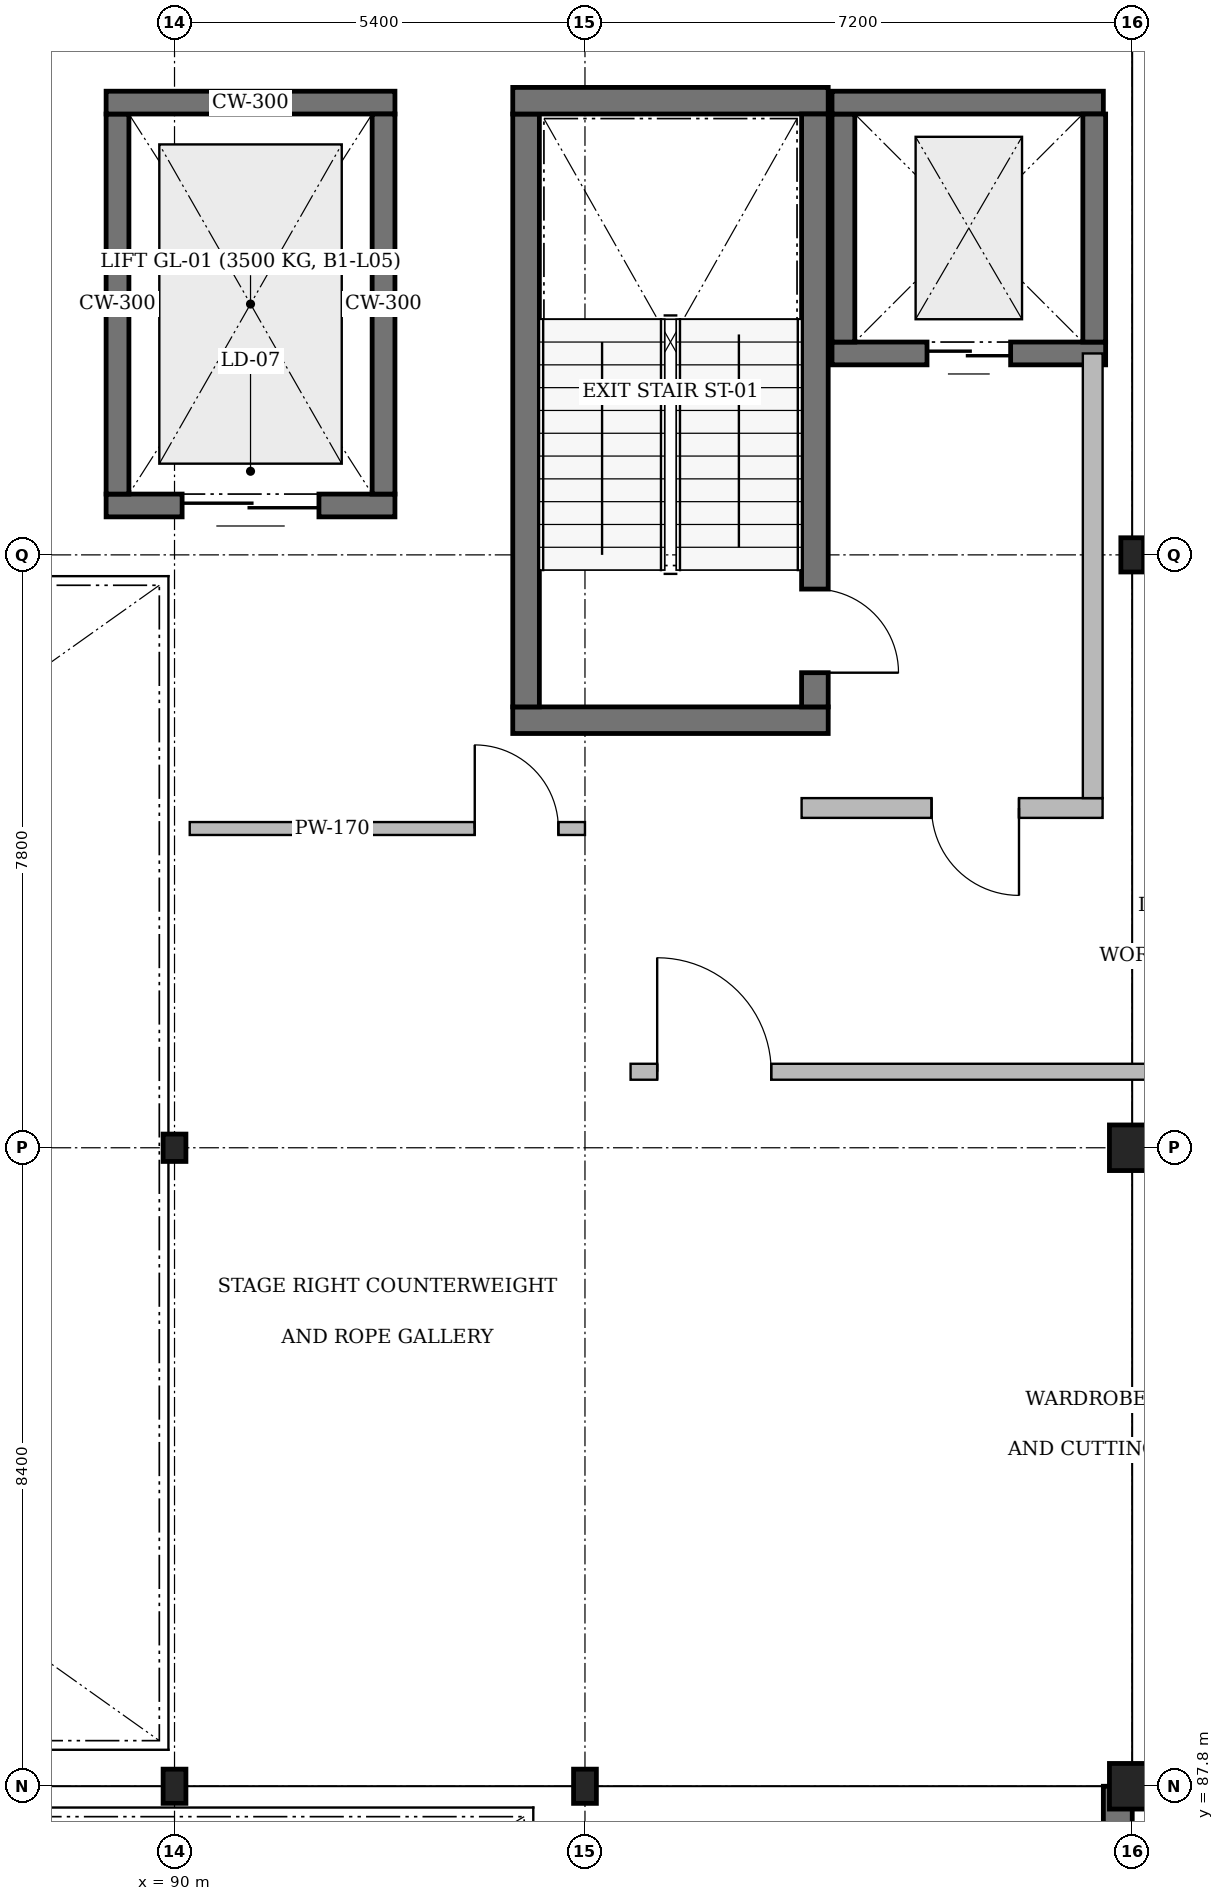
"""IFC4 building model, lengths in metres.
Left out: names, types, materials, properties, quantities, classifications, styles, units other than length and angle.
Written with IfcOpenShell. Run it as: python <this file> out.ifc"""

import sys

from ifc_helpers import new_model, si_unit, direction, frame, frame_2d, origin, origin_2d, place, context, subcontext, project, spatial, rectangle, i_section, extrude, element, fill, save


model = new_model("IFC4")
c1 = context("Model", 3, precision=1e-05, world=origin(), true_north=direction((0.0, 1.0)))
c2 = subcontext(c1, "Body", "Model", "MODEL_VIEW")
j1 = project(units=[si_unit("LENGTHUNIT", "METRE"), si_unit("PLANEANGLEUNIT", "RADIAN")], contexts=[c1])
p1 = place(None, origin())
s1 = spatial("IfcSite", under=j1, at=p1, CompositionType="ELEMENT")
p2 = place(p1, origin())
s2 = spatial("IfcBuilding", under=s1, at=p2, CompositionType="ELEMENT")
p3 = place(p2, frame((0.0, 0.0, 9.0)))
s3 = spatial("IfcBuildingStorey", under=s2, at=p3, CompositionType="ELEMENT", Elevation=9.0)
p4 = place(p3, frame((90.0, 87.8, 0.0), z_axis=(0.0, 0.0, 1.0), x_axis=(1.0, 0.0, 0.0)))
e1 = element("IfcColumn", 1, at=p4, inside=s3, PredefinedType="COLUMN", context=c2, shape_type="SweptSolid", body=[
    extrude(i_section(OverallWidth=0.3, OverallDepth=0.45, WebThickness=0.014, FlangeThickness=0.026, FilletRadius=0.027, at=origin_2d()), origin(), (0.0, 0.0, 1.0), 4.2),
])
p5 = place(p3, frame((90.0, 96.2, 0.0), z_axis=(0.0, 0.0, 1.0), x_axis=(1.0, 0.0, 0.0)))
e2 = element("IfcColumn", 2, at=p5, inside=s3, PredefinedType="COLUMN", context=c2, shape_type="SweptSolid", body=[
    extrude(i_section(OverallWidth=0.3, OverallDepth=0.36, WebThickness=0.012, FlangeThickness=0.022, FilletRadius=0.027, at=origin_2d()), origin(), (0.0, 0.0, 1.0), 4.2),
])
p6 = place(p3, frame((95.4, 87.8, 0.0), z_axis=(0.0, 0.0, 1.0), x_axis=(1.0, 0.0, 0.0)))
e3 = element("IfcColumn", 3, at=p6, inside=s3, PredefinedType="COLUMN", context=c2, shape_type="SweptSolid", body=[
    extrude(i_section(OverallWidth=0.3, OverallDepth=0.45, WebThickness=0.014, FlangeThickness=0.026, FilletRadius=0.027, at=origin_2d()), origin(), (0.0, 0.0, 1.0), 4.2),
])
for number, where, z_axis, x_axis in (
    (4, (102.6, 87.8, 0.0), (0.0, 0.0, 1.0), (1.0, 0.0, 0.0)),
    (5, (102.6, 96.2, 0.0), (0.0, 0.0, 1.0), (1.0, 0.0, 0.0)),
):
    element("IfcColumn", number, at=place(p3, frame(where, z_axis=z_axis, x_axis=x_axis)), inside=s3, PredefinedType="COLUMN", context=c2, shape_type="SweptSolid", body=[
        extrude(rectangle(XDim=0.6, YDim=0.6, at=origin_2d()), origin(), (0.0, 0.0, 1.0), 4.2),
    ])
p7 = place(p3, frame((102.6, 104.0, 0.0), z_axis=(0.0, 0.0, 1.0), x_axis=(1.0, 0.0, 0.0)))
e6 = element("IfcColumn", 6, at=p7, inside=s3, PredefinedType="COLUMN", context=c2, shape_type="SweptSolid", body=[
    extrude(i_section(OverallWidth=0.3, OverallDepth=0.45, WebThickness=0.014, FlangeThickness=0.026, FilletRadius=0.027, at=origin_2d()), origin(), (0.0, 0.0, 1.0), 4.2),
])
p8 = place(p3, frame((98.6, 101.825, 0.0), z_axis=(0.0, 0.0, 1.0), x_axis=(-1.0, 0.0, 0.0)))
e7 = element("IfcWall", 7, at=p8, inside=s3, PredefinedType="SOLIDWALL", context=c2, shape_type="SweptSolid", body=[
    extrude(rectangle(XDim=4.15, YDim=0.35, at=frame_2d((2.075, 0.0))), origin(), (0.0, 0.0, 1.0), 4.2),
])
p9 = place(p3, frame((94.625, 102.0, 0.0), z_axis=(0.0, 0.0, 1.0), x_axis=(0.0, 1.0, 0.0)))
e8 = element("IfcWall", 8, at=p9, inside=s3, PredefinedType="SOLIDWALL", context=c2, shape_type="SweptSolid", body=[
    extrude(rectangle(XDim=7.8, YDim=0.35, at=frame_2d((3.9, 0.0))), origin(), (0.0, 0.0, 1.0), 4.2),
])
p10 = place(p3, frame((94.45, 109.975, 0.0), z_axis=(0.0, 0.0, 1.0), x_axis=(1.0, 0.0, 0.0)))
e9 = element("IfcWall", 9, at=p10, inside=s3, PredefinedType="SOLIDWALL", context=c2, shape_type="SweptSolid", body=[
    extrude(rectangle(XDim=4.15, YDim=0.35, at=frame_2d((2.075, 0.0))), origin(), (0.0, 0.0, 1.0), 4.2),
])
p11 = place(p3, frame((98.425, 109.8, 0.0), z_axis=(0.0, 0.0, 1.0), x_axis=(0.0, -1.0, 0.0)))
e10 = element("IfcWall", 10, at=p11, inside=s3, PredefinedType="SOLIDWALL", context=c2, shape_type="SweptSolid", body=[
    extrude(rectangle(XDim=7.8, YDim=0.35, at=frame_2d((3.9, 0.0))), origin(), (0.0, 0.0, 1.0), 4.2),
])
p12 = place(p11, frame((6.25, 0.0, 0.0)))
e11 = element("IfcOpeningElement", 11, at=p12, cuts=e10, PredefinedType="OPENING", context=c2, shape_type="SweptSolid", body=[
    extrude(rectangle(XDim=1.1, YDim=2.15, at=frame_2d((0.55, 1.075))), frame((0.0, 0.195, 0.0), z_axis=(0.0, -1.0, 0.0), x_axis=(1.0, 0.0, 0.0)), (0.0, 0.0, 1.0), 0.39),
])
p13 = place(p3, frame((102.25, 106.65, 0.0), z_axis=(0.0, 0.0, 1.0), x_axis=(-1.0, 0.0, 0.0)))
e12 = element("IfcWall", 12, at=p13, inside=s3, PredefinedType="SOLIDWALL", context=c2, shape_type="SweptSolid", body=[
    extrude(rectangle(XDim=3.6, YDim=0.3, at=frame_2d((1.8, 0.0))), origin(), (0.0, 0.0, 1.0), 4.2),
])
p14 = place(p13, frame((1.25, 0.0, 0.0)))
e13 = element("IfcOpeningElement", 13, at=p14, cuts=e12, PredefinedType="OPENING", context=c2, shape_type="SweptSolid", body=[
    extrude(rectangle(XDim=1.1, YDim=2.1, at=frame_2d((0.55, 1.05))), frame((0.0, 0.17, 0.0), z_axis=(0.0, -1.0, 0.0), x_axis=(1.0, 0.0, 0.0)), (0.0, 0.0, 1.0), 0.34),
])
p15 = place(p3, frame((98.8, 106.8, 0.0), z_axis=(0.0, 0.0, 1.0), x_axis=(0.0, 1.0, 0.0)))
e14 = element("IfcWall", 14, at=p15, inside=s3, PredefinedType="SOLIDWALL", context=c2, shape_type="SweptSolid", body=[
    extrude(rectangle(XDim=3.0, YDim=0.3, at=frame_2d((1.5, 0.0))), origin(), (0.0, 0.0, 1.0), 4.2),
])
p16 = place(p3, frame((98.65, 109.95, 0.0), z_axis=(0.0, 0.0, 1.0), x_axis=(1.0, 0.0, 0.0)))
e15 = element("IfcWall", 15, at=p16, inside=s3, PredefinedType="SOLIDWALL", context=c2, shape_type="SweptSolid", body=[
    extrude(rectangle(XDim=3.57, YDim=0.3, at=frame_2d((1.785, 0.0))), origin(), (0.0, 0.0, 1.0), 4.2),
])
p17 = place(p3, frame((102.1, 109.8, 0.0), z_axis=(0.0, 0.0, 1.0), x_axis=(0.0, -1.0, 0.0)))
e16 = element("IfcWall", 16, at=p17, inside=s3, PredefinedType="SOLIDWALL", context=c2, shape_type="SweptSolid", body=[
    extrude(rectangle(XDim=3.0, YDim=0.3, at=frame_2d((1.5, 0.0))), origin(), (0.0, 0.0, 1.0), 4.2),
])
p18 = place(p3, frame((102.21, 100.67, 0.0), z_axis=(0.0, 0.0, 1.0), x_axis=(-1.0, 0.0, 0.0)))
e17 = element("IfcWall", 17, at=p18, inside=s3, PredefinedType="SOLIDWALL", context=c2, shape_type="SweptSolid", body=[
    extrude(rectangle(XDim=3.96, YDim=0.26, at=frame_2d((1.98, 0.0))), origin(), (0.0, 0.0, 1.0), 3.95),
])
p19 = place(p18, frame((1.1, 0.0, 0.0)))
e18 = element("IfcOpeningElement", 18, at=p19, cuts=e17, PredefinedType="OPENING", context=c2, shape_type="SweptSolid", body=[
    extrude(rectangle(XDim=1.15, YDim=2.2, at=frame_2d((0.575, 1.1))), frame((0.0, 0.15, 0.0), z_axis=(0.0, -1.0, 0.0), x_axis=(1.0, 0.0, 0.0)), (0.0, 0.0, 1.0), 0.3),
])
p20 = place(p3, frame((102.08, 106.65, 0.0), z_axis=(0.0, 0.0, 1.0), x_axis=(0.0, -1.0, 0.0)))
e19 = element("IfcWall", 19, at=p20, inside=s3, PredefinedType="SOLIDWALL", context=c2, shape_type="SweptSolid", body=[
    extrude(rectangle(XDim=5.85, YDim=0.26, at=frame_2d((2.925, 0.0))), origin(), (0.0, 0.0, 1.0), 3.95),
])
p21 = place(p3, frame((92.9, 104.65, 0.0), z_axis=(0.0, 0.0, 1.0), x_axis=(-1.0, 0.0, 0.0)))
e20 = element("IfcWall", 20, at=p21, inside=s3, PredefinedType="SOLIDWALL", context=c2, shape_type="SweptSolid", body=[
    extrude(rectangle(XDim=3.8, YDim=0.3, at=frame_2d((1.9, 0.0))), origin(), (0.0, 0.0, 1.0), 4.2),
])
p22 = place(p21, frame((1.0, 0.0, 0.0)))
e21 = element("IfcOpeningElement", 21, at=p22, cuts=e20, PredefinedType="OPENING", context=c2, shape_type="SweptSolid", body=[
    extrude(rectangle(XDim=1.8, YDim=2.4, at=frame_2d((0.9, 1.2))), frame((0.0, 0.17, 0.0), z_axis=(0.0, -1.0, 0.0), x_axis=(1.0, 0.0, 0.0)), (0.0, 0.0, 1.0), 0.34),
])
p23 = place(p3, frame((89.25, 104.8, 0.0), z_axis=(0.0, 0.0, 1.0), x_axis=(0.0, 1.0, 0.0)))
e22 = element("IfcWall", 22, at=p23, inside=s3, PredefinedType="SOLIDWALL", context=c2, shape_type="SweptSolid", body=[
    extrude(rectangle(XDim=5.0, YDim=0.3, at=frame_2d((2.5, 0.0))), origin(), (0.0, 0.0, 1.0), 4.2),
])
p24 = place(p3, frame((89.1, 109.95, 0.0), z_axis=(0.0, 0.0, 1.0), x_axis=(1.0, 0.0, 0.0)))
e23 = element("IfcWall", 23, at=p24, inside=s3, PredefinedType="SOLIDWALL", context=c2, shape_type="SweptSolid", body=[
    extrude(rectangle(XDim=3.8, YDim=0.3, at=frame_2d((1.9, 0.0))), origin(), (0.0, 0.0, 1.0), 4.2),
])
p25 = place(p3, frame((92.75, 109.8, 0.0), z_axis=(0.0, 0.0, 1.0), x_axis=(0.0, -1.0, 0.0)))
e24 = element("IfcWall", 24, at=p25, inside=s3, PredefinedType="SOLIDWALL", context=c2, shape_type="SweptSolid", body=[
    extrude(rectangle(XDim=5.0, YDim=0.3, at=frame_2d((2.5, 0.0))), origin(), (0.0, 0.0, 1.0), 4.2),
])
p26 = place(p3, frame((102.41, 87.8, 0.0), z_axis=(0.0, 0.0, 1.0), x_axis=(0.0, -1.0, 0.0)))
e25 = element("IfcWall", 25, at=p26, inside=s3, PredefinedType="SOLIDWALL", context=c2, shape_type="SweptSolid", body=[
    extrude(rectangle(XDim=36.0, YDim=0.38, at=frame_2d((18.0, 0.0))), origin(), (0.0, 0.0, 1.0), 3.96),
])
p27 = place(p26, frame((3.09, 0.0, 0.95)))
e26 = element("IfcOpeningElement", 26, at=p27, cuts=e25, PredefinedType="OPENING", context=c2, shape_type="SweptSolid", body=[
    extrude(rectangle(XDim=1.02, YDim=1.8, at=frame_2d((0.51, 0.9))), frame((0.0, 0.21, 0.0), z_axis=(0.0, -1.0, 0.0), x_axis=(1.0, 0.0, 0.0)), (0.0, 0.0, 1.0), 0.42),
])
p28 = place(p26, frame((10.11, 0.0, 0.95)))
e27 = element("IfcOpeningElement", 27, at=p28, cuts=e25, PredefinedType="OPENING", context=c2, shape_type="SweptSolid", body=[
    extrude(rectangle(XDim=1.38, YDim=1.95, at=frame_2d((0.69, 0.975))), frame((0.0, 0.21, 0.0), z_axis=(0.0, -1.0, 0.0), x_axis=(1.0, 0.0, 0.0)), (0.0, 0.0, 1.0), 0.42),
])
p29 = place(p26, frame((17.375, 0.0, 0.95)))
e28 = element("IfcOpeningElement", 28, at=p29, cuts=e25, PredefinedType="OPENING", context=c2, shape_type="SweptSolid", body=[
    extrude(rectangle(XDim=1.25, YDim=1.9, at=frame_2d((0.625, 0.95))), frame((0.0, 0.21, 0.0), z_axis=(0.0, -1.0, 0.0), x_axis=(1.0, 0.0, 0.0)), (0.0, 0.0, 1.0), 0.42),
])
p30 = place(p26, frame((24.63, 0.0, 0.95)))
e29 = element("IfcOpeningElement", 29, at=p30, cuts=e25, PredefinedType="OPENING", context=c2, shape_type="SweptSolid", body=[
    extrude(rectangle(XDim=1.14, YDim=1.85, at=frame_2d((0.57, 0.925))), frame((0.0, 0.21, 0.0), z_axis=(0.0, -1.0, 0.0), x_axis=(1.0, 0.0, 0.0)), (0.0, 0.0, 1.0), 0.42),
])
p31 = place(p26, frame((31.525, 0.0, 0.95)))
e30 = element("IfcOpeningElement", 30, at=p31, cuts=e25, PredefinedType="OPENING", context=c2, shape_type="SweptSolid", body=[
    extrude(rectangle(XDim=1.75, YDim=1.65, at=frame_2d((0.875, 0.825))), frame((0.0, 0.21, 0.0), z_axis=(0.0, -1.0, 0.0), x_axis=(1.0, 0.0, 0.0)), (0.0, 0.0, 1.0), 0.42),
])
p32 = place(p3, frame((96.0, 97.2, 0.0), z_axis=(0.0, 0.0, 1.0), x_axis=(1.0, 0.0, 0.0)))
e31 = element("IfcWall", 31, at=p32, inside=s3, PredefinedType="PARTITIONING", context=c2, shape_type="SweptSolid", body=[
    extrude(rectangle(XDim=13.6, YDim=0.21, at=frame_2d((6.8, 0.0))), origin(), (0.0, 0.0, 1.0), 3.95),
])
p33 = place(p32, frame((0.35, 0.0, 0.0)))
e32 = element("IfcOpeningElement", 32, at=p33, cuts=e31, PredefinedType="OPENING", context=c2, shape_type="SweptSolid", body=[
    extrude(rectangle(XDim=1.5, YDim=2.25, at=frame_2d((0.75, 1.125))), frame((0.0, 0.125, 0.0), z_axis=(0.0, -1.0, 0.0), x_axis=(1.0, 0.0, 0.0)), (0.0, 0.0, 1.0), 0.25),
])
p34 = place(p3, frame((90.2, 100.4, 0.0), z_axis=(0.0, 0.0, 1.0), x_axis=(1.0, 0.0, 0.0)))
e33 = element("IfcWall", 33, at=p34, inside=s3, PredefinedType="PARTITIONING", context=c2, shape_type="SweptSolid", body=[
    extrude(rectangle(XDim=5.2, YDim=0.17, at=frame_2d((2.6, 0.0))), origin(), (0.0, 0.0, 1.0), 3.95),
])
p35 = place(p34, frame((3.75, 0.0, 0.0)))
e34 = element("IfcOpeningElement", 34, at=p35, cuts=e33, PredefinedType="OPENING", context=c2, shape_type="SweptSolid", body=[
    extrude(rectangle(XDim=1.1, YDim=2.1, at=frame_2d((0.55, 1.05))), frame((0.0, 0.105, 0.0), z_axis=(0.0, -1.0, 0.0), x_axis=(1.0, 0.0, 0.0)), (0.0, 0.0, 1.0), 0.21),
])
p36 = place(p12, origin())
e35 = element("IfcDoor", 35, at=p36, inside=s3, OperationType="SINGLE_SWING_RIGHT", PredefinedType="DOOR", context=c2, shape_type="SweptSolid", body=[
    extrude(rectangle(XDim=1.1, YDim=2.15, at=frame_2d((0.55, 1.075))), frame((0.0, 0.025, 0.0), z_axis=(0.0, -1.0, 0.0), x_axis=(1.0, 0.0, 0.0)), (0.0, 0.0, 1.0), 0.05),
])
fill(e11, e35)
p37 = place(p14, origin())
e36 = element("IfcDoor", 36, at=p37, inside=s3, OperationType="DOUBLE_DOOR_SLIDING", PredefinedType="DOOR", context=c2, shape_type="SweptSolid", body=[
    extrude(rectangle(XDim=1.1, YDim=2.1, at=frame_2d((0.55, 1.05))), frame((0.0, 0.025, 0.0), z_axis=(0.0, -1.0, 0.0), x_axis=(1.0, 0.0, 0.0)), (0.0, 0.0, 1.0), 0.05),
])
fill(e13, e36)
p38 = place(p19, origin())
e37 = element("IfcDoor", 37, at=p38, inside=s3, OperationType="SINGLE_SWING_LEFT", PredefinedType="DOOR", context=c2, shape_type="SweptSolid", body=[
    extrude(rectangle(XDim=1.15, YDim=2.2, at=frame_2d((0.575, 1.1))), frame((0.0, 0.025, 0.0), z_axis=(0.0, -1.0, 0.0), x_axis=(1.0, 0.0, 0.0)), (0.0, 0.0, 1.0), 0.05),
])
fill(e18, e37)
p39 = place(p22, origin())
e38 = element("IfcDoor", 38, at=p39, inside=s3, OperationType="DOUBLE_DOOR_SLIDING", PredefinedType="DOOR", context=c2, shape_type="SweptSolid", body=[
    extrude(rectangle(XDim=1.8, YDim=2.4, at=frame_2d((0.9, 1.2))), frame((0.0, 0.025, 0.0), z_axis=(0.0, -1.0, 0.0), x_axis=(1.0, 0.0, 0.0)), (0.0, 0.0, 1.0), 0.05),
])
fill(e21, e38)
p40 = place(p33, origin())
e39 = element("IfcDoor", 39, at=p40, inside=s3, OperationType="DOUBLE_DOOR_SINGLE_SWING", PredefinedType="DOOR", context=c2, shape_type="SweptSolid", body=[
    extrude(rectangle(XDim=1.5, YDim=2.25, at=frame_2d((0.75, 1.125))), frame((0.0, 0.025, 0.0), z_axis=(0.0, -1.0, 0.0), x_axis=(1.0, 0.0, 0.0)), (0.0, 0.0, 1.0), 0.05),
])
fill(e32, e39)
p41 = place(p35, origin())
e40 = element("IfcDoor", 40, at=p41, inside=s3, OperationType="SINGLE_SWING_LEFT", PredefinedType="DOOR", context=c2, shape_type="SweptSolid", body=[
    extrude(rectangle(XDim=1.1, YDim=2.1, at=frame_2d((0.55, 1.05))), frame((0.0, 0.025, 0.0), z_axis=(0.0, -1.0, 0.0), x_axis=(1.0, 0.0, 0.0)), (0.0, 0.0, 1.0), 0.05),
])
fill(e34, e40)
save(model, sys.argv[1])
